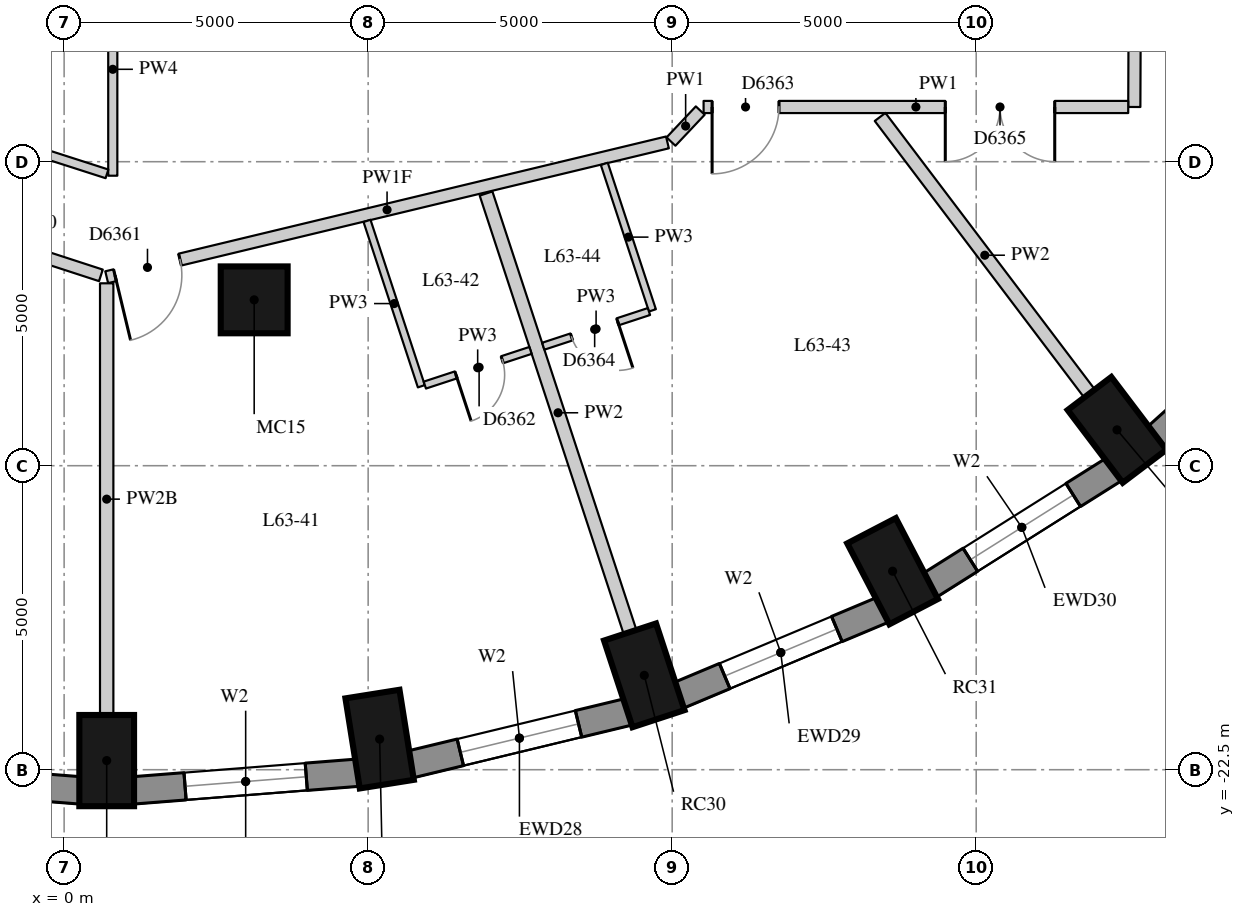
"""IFC4 building model, lengths in metres.
Left out: names, types, materials, properties, quantities, classifications, styles, units other than length and angle.
Written with IfcOpenShell. Run it as: python <this file> out.ifc"""

import sys

from ifc_helpers import new_model, si_unit, direction, frame, frame_2d, origin, origin_2d, place, context, subcontext, project, spatial, rectangle, extrude, element, fill, save


model = new_model("IFC4")
c1 = context("Model", 3, precision=1e-05, world=origin(), true_north=direction((0.0, 1.0)))
c2 = subcontext(c1, "Body", "Model", "MODEL_VIEW")
j1 = project(units=[si_unit("LENGTHUNIT", "METRE"), si_unit("PLANEANGLEUNIT", "RADIAN")], contexts=[c1])
p1 = place(None, origin())
s1 = spatial("IfcSite", under=j1, at=p1, CompositionType="ELEMENT")
p2 = place(p1, origin())
s2 = spatial("IfcBuilding", under=s1, at=p2, CompositionType="ELEMENT")
p3 = place(p2, frame((0.0, 0.0, 222.2)))
s3 = spatial("IfcBuildingStorey", under=s2, at=p3, CompositionType="ELEMENT", Elevation=222.2)
for number, where, z_axis, x_axis in (
    (1, (0.7, -22.35, 0.0), (0.0, 0.0, 1.0), (0.0, -1.0, 0.0)),
    (2, (5.189, -21.997, 0.0), (0.0, 0.0, 1.0), (0.157, -0.988, 0.0)),
    (3, (9.541, -20.948, 0.0), (0.0, 0.0, 1.0), (0.312, -0.95, 0.0)),
    (4, (13.625, -19.235, 0.0), (0.0, 0.0, 1.0), (0.462, -0.887, 0.0)),
    (5, (17.316, -16.911, 0.0), (0.0, 0.0, 1.0), (0.604, -0.797, 0.0)),
):
    element("IfcColumn", number, at=place(p3, frame(where, z_axis=z_axis, x_axis=x_axis)), inside=s3, PredefinedType="COLUMN", context=c2, shape_type="SweptSolid", body=[
        extrude(rectangle(XDim=1.5, YDim=0.9, at=origin_2d()), origin(), (0.0, 0.0, 1.0), 3.3),
    ])
p4 = place(p3, frame((3.126, -14.772, 0.0), z_axis=(0.0, 0.0, 1.0), x_axis=(1.0, 0.0, 0.0)))
e6 = element("IfcColumn", 6, at=p4, inside=s3, PredefinedType="COLUMN", context=c2, shape_type="SweptSolid", body=[
    extrude(rectangle(XDim=1.1, YDim=1.1, at=origin_2d()), origin(), (0.0, 0.0, 1.0), 3.3),
])
p5 = place(p3, frame((-3.441, -22.548, 0.0), z_axis=(0.0, 0.0, 1.0), x_axis=(0.996913971077, -0.078501810629, 0.0)))
e7 = element("IfcWall", 7, at=p5, inside=s3, PredefinedType="SOLIDWALL", context=c2, shape_type="SweptSolid", body=[
    extrude(rectangle(XDim=3.723, YDim=0.45, at=frame_2d((1.861, 0.0))), origin(), (0.0, 0.0, 1.0), 3.02),
])
p6 = place(p5, frame((0.861, 0.0, 0.4)))
e8 = element("IfcOpeningElement", 8, at=p6, cuts=e7, PredefinedType="OPENING", context=c2, shape_type="SweptSolid", body=[
    extrude(rectangle(XDim=2.0, YDim=1.75, at=frame_2d((1.0, 0.875))), frame((0.0, 0.235, 0.0), z_axis=(0.0, -1.0, 0.0), x_axis=(1.0, 0.0, 0.0)), (0.0, 0.0, 1.0), 0.47),
])
p7 = place(p3, frame((1.13, -22.841, 0.0), z_axis=(0.0, 0.0, 1.0), x_axis=(0.996913566885, 0.078506943392, 0.0)))
e9 = element("IfcWall", 9, at=p7, inside=s3, PredefinedType="SOLIDWALL", context=c2, shape_type="SweptSolid", body=[
    extrude(rectangle(XDim=3.722, YDim=0.45, at=frame_2d((1.861, 0.0))), origin(), (0.0, 0.0, 1.0), 3.02),
])
p8 = place(p7, frame((0.861, 0.0, 0.4)))
e10 = element("IfcOpeningElement", 10, at=p8, cuts=e9, PredefinedType="OPENING", context=c2, shape_type="SweptSolid", body=[
    extrude(rectangle(XDim=2.0, YDim=1.75, at=frame_2d((1.0, 0.875))), frame((0.0, 0.235, 0.0), z_axis=(0.0, -1.0, 0.0), x_axis=(1.0, 0.0, 0.0)), (0.0, 0.0, 1.0), 0.47),
])
p9 = place(p3, frame((5.691, -22.414, 0.0), z_axis=(0.0, 0.0, 1.0), x_axis=(0.9721584944, 0.234324266275, 0.0)))
e11 = element("IfcWall", 11, at=p9, inside=s3, PredefinedType="SOLIDWALL", context=c2, shape_type="SweptSolid", body=[
    extrude(rectangle(XDim=3.698, YDim=0.45, at=frame_2d((1.849, 0.0))), origin(), (0.0, 0.0, 1.0), 3.02),
])
p10 = place(p9, frame((0.849, 0.0, 0.4)))
e12 = element("IfcOpeningElement", 12, at=p10, cuts=e11, PredefinedType="OPENING", context=c2, shape_type="SweptSolid", body=[
    extrude(rectangle(XDim=2.0, YDim=1.75, at=frame_2d((1.0, 0.875))), frame((0.0, 0.235, 0.0), z_axis=(0.0, -1.0, 0.0), x_axis=(1.0, 0.0, 0.0)), (0.0, 0.0, 1.0), 0.47),
])
p11 = place(p3, frame((10.103, -21.279, 0.0), z_axis=(0.0, 0.0, 1.0), x_axis=(0.922168222612, 0.386789050006, 0.0)))
e13 = element("IfcWall", 13, at=p11, inside=s3, PredefinedType="SOLIDWALL", context=c2, shape_type="SweptSolid", body=[
    extrude(rectangle(XDim=3.651, YDim=0.45, at=frame_2d((1.825, 0.0))), origin(), (0.0, 0.0, 1.0), 3.02),
])
p12 = place(p11, frame((0.825, 0.0, 0.4)))
e14 = element("IfcOpeningElement", 14, at=p12, cuts=e13, PredefinedType="OPENING", context=c2, shape_type="SweptSolid", body=[
    extrude(rectangle(XDim=2.0, YDim=1.75, at=frame_2d((1.0, 0.875))), frame((0.0, 0.235, 0.0), z_axis=(0.0, -1.0, 0.0), x_axis=(1.0, 0.0, 0.0)), (0.0, 0.0, 1.0), 0.47),
])
p13 = place(p3, frame((14.232, -19.47, 0.0), z_axis=(0.0, 0.0, 1.0), x_axis=(0.84614984472, 0.532945063098, 0.0)))
e15 = element("IfcWall", 15, at=p13, inside=s3, PredefinedType="SOLIDWALL", context=c2, shape_type="SweptSolid", body=[
    extrude(rectangle(XDim=3.586, YDim=0.45, at=frame_2d((1.793, 0.0))), origin(), (0.0, 0.0, 1.0), 3.02),
])
p14 = place(p13, frame((0.793, 0.0, 0.4)))
e16 = element("IfcOpeningElement", 16, at=p14, cuts=e15, PredefinedType="OPENING", context=c2, shape_type="SweptSolid", body=[
    extrude(rectangle(XDim=2.0, YDim=1.75, at=frame_2d((1.0, 0.875))), frame((0.0, 0.235, 0.0), z_axis=(0.0, -1.0, 0.0), x_axis=(1.0, 0.0, 0.0)), (0.0, 0.0, 1.0), 0.47),
])
p15 = place(p3, frame((17.953, -17.04, 0.0), z_axis=(0.0, 0.0, 1.0), x_axis=(0.743442727602, 0.668799604348, 0.0)))
e17 = element("IfcWall", 17, at=p15, inside=s3, PredefinedType="SOLIDWALL", context=c2, shape_type="SweptSolid", body=[
    extrude(rectangle(XDim=3.513, YDim=0.45, at=frame_2d((1.756, 0.0))), origin(), (0.0, 0.0, 1.0), 3.02),
])
p16 = place(p3, frame((17.63, -4.043, 0.0), z_axis=(0.0, 0.0, 1.0), x_axis=(-0.003908870153, -0.999992360338, 0.0)))
e18 = element("IfcWall", 18, at=p16, inside=s3, PredefinedType="PARTITIONING", context=c2, shape_type="SweptSolid", body=[
    extrude(rectangle(XDim=7.557, YDim=0.2, at=frame_2d((3.779, 0.0))), origin(), (0.0, 0.0, 1.0), 3.02),
])
p17 = place(p3, frame((17.5, -11.6, 0.0), z_axis=(0.0, 0.0, 1.0), x_axis=(-1.0, 0.0, 0.0)))
e19 = element("IfcWall", 19, at=p17, inside=s3, PredefinedType="PARTITIONING", context=c2, shape_type="SweptSolid", body=[
    extrude(rectangle(XDim=6.983, YDim=0.2, at=frame_2d((3.492, 0.0))), origin(), (0.0, 0.0, 1.0), 3.02),
])
p18 = place(p17, frame((5.743, 0.0, 0.0)))
e20 = element("IfcOpeningElement", 20, at=p18, cuts=e19, PredefinedType="OPENING", context=c2, shape_type="SweptSolid", body=[
    extrude(rectangle(XDim=1.1, YDim=2.1, at=frame_2d((0.55, 1.05))), frame((0.0, 0.11, 0.0), z_axis=(0.0, -1.0, 0.0), x_axis=(1.0, 0.0, 0.0)), (0.0, 0.0, 1.0), 0.22),
])
p19 = place(p17, frame((1.208, 0.0, 0.0)))
e21 = element("IfcOpeningElement", 21, at=p19, cuts=e19, PredefinedType="OPENING", context=c2, shape_type="SweptSolid", body=[
    extrude(rectangle(XDim=1.8, YDim=2.1, at=frame_2d((0.9, 1.05))), frame((0.0, 0.11, 0.0), z_axis=(0.0, -1.0, 0.0), x_axis=(1.0, 0.0, 0.0)), (0.0, 0.0, 1.0), 0.22),
])
p20 = place(p3, frame((10.462, -11.659, 0.0), z_axis=(0.0, 0.0, 1.0), x_axis=(-0.686265612426, -0.727351021998, 0.0)))
e22 = element("IfcWall", 22, at=p20, inside=s3, PredefinedType="PARTITIONING", context=c2, shape_type="SweptSolid", body=[
    extrude(rectangle(XDim=0.701, YDim=0.2, at=frame_2d((0.351, 0.0))), origin(), (0.0, 0.0, 1.0), 3.02),
])
p21 = place(p3, frame((9.922, -12.183, 0.0), z_axis=(0.0, 0.0, 1.0), x_axis=(-0.972292362394, -0.233768180104, 0.0)))
e23 = element("IfcWall", 23, at=p21, inside=s3, PredefinedType="PARTITIONING", context=c2, shape_type="SweptSolid", body=[
    extrude(rectangle(XDim=9.485, YDim=0.2, at=frame_2d((4.742, 0.0))), origin(), (0.0, 0.0, 1.0), 2.42),
])
p22 = place(p21, frame((8.245, 0.0, 0.0)))
e24 = element("IfcOpeningElement", 24, at=p22, cuts=e23, PredefinedType="OPENING", context=c2, shape_type="SweptSolid", body=[
    extrude(rectangle(XDim=1.1, YDim=2.1, at=frame_2d((0.55, 1.05))), frame((0.0, 0.11, 0.0), z_axis=(0.0, -1.0, 0.0), x_axis=(1.0, 0.0, 0.0)), (0.0, 0.0, 1.0), 0.22),
])
p23 = place(p3, frame((0.605, -14.369, 0.0), z_axis=(0.0, 0.0, 1.0), x_axis=(-0.950994614205, 0.309207444529, 0.0)))
e25 = element("IfcWall", 25, at=p23, inside=s3, PredefinedType="PARTITIONING", context=c2, shape_type="SweptSolid", body=[
    extrude(rectangle(XDim=8.733, YDim=0.2, at=frame_2d((4.366, 0.0))), origin(), (0.0, 0.0, 1.0), 3.02),
])
p24 = place(p23, frame((7.04, 0.0, 0.0)))
e26 = element("IfcOpeningElement", 26, at=p24, cuts=e25, PredefinedType="OPENING", context=c2, shape_type="SweptSolid", body=[
    extrude(rectangle(XDim=0.9, YDim=2.1, at=frame_2d((0.45, 1.05))), frame((0.0, 0.11, 0.0), z_axis=(0.0, -1.0, 0.0), x_axis=(1.0, 0.0, 0.0)), (0.0, 0.0, 1.0), 0.22),
])
p25 = place(p23, frame((4.375, 0.0, 0.0)))
e27 = element("IfcOpeningElement", 27, at=p25, cuts=e25, PredefinedType="OPENING", context=c2, shape_type="SweptSolid", body=[
    extrude(rectangle(XDim=0.9, YDim=2.1, at=frame_2d((0.45, 1.05))), frame((0.0, 0.11, 0.0), z_axis=(0.0, -1.0, 0.0), x_axis=(1.0, 0.0, 0.0)), (0.0, 0.0, 1.0), 0.22),
])
p26 = place(p23, frame((1.145, 0.0, 0.0)))
e28 = element("IfcOpeningElement", 28, at=p26, cuts=e25, PredefinedType="OPENING", context=c2, shape_type="SweptSolid", body=[
    extrude(rectangle(XDim=0.9, YDim=2.1, at=frame_2d((0.45, 1.05))), frame((0.0, 0.11, 0.0), z_axis=(0.0, -1.0, 0.0), x_axis=(1.0, 0.0, 0.0)), (0.0, 0.0, 1.0), 0.22),
])
p27 = place(p3, frame((0.8, -9.23, 0.0), z_axis=(0.0, 0.0, 1.0), x_axis=(0.0, -1.0, 0.0)))
e29 = element("IfcWall", 29, at=p27, inside=s3, PredefinedType="PARTITIONING", context=c2, shape_type="SweptSolid", body=[
    extrude(rectangle(XDim=3.5, YDim=0.15, at=frame_2d((1.75, 0.0))), origin(), (0.0, 0.0, 1.0), 3.02),
])
p28 = place(p3, frame((0.705, -12.7, 0.0), z_axis=(0.0, 0.0, 1.0), x_axis=(-0.952035530576, 0.305987497327, 0.0)))
e30 = element("IfcWall", 30, at=p28, inside=s3, PredefinedType="PARTITIONING", context=c2, shape_type="SweptSolid", body=[
    extrude(rectangle(XDim=5.467, YDim=0.15, at=frame_2d((2.733, 0.0))), origin(), (0.0, 0.0, 1.0), 3.02),
])
p29 = place(p3, frame((0.7, -21.6, 0.0), z_axis=(0.0, 0.0, 1.0), x_axis=(0.0, 1.0, 0.0)))
e31 = element("IfcWall", 31, at=p29, inside=s3, PredefinedType="PARTITIONING", context=c2, shape_type="SweptSolid", body=[
    extrude(rectangle(XDim=7.1, YDim=0.22, at=frame_2d((3.55, 0.0))), origin(), (0.0, 0.0, 1.0), 2.57),
])
p30 = place(p3, frame((9.307, -20.235, 0.0), z_axis=(0.0, 0.0, 1.0), x_axis=(-0.311979110549, 0.950088961404, 0.0)))
e32 = element("IfcWall", 32, at=p30, inside=s3, PredefinedType="PARTITIONING", context=c2, shape_type="SweptSolid", body=[
    extrude(rectangle(XDim=7.591, YDim=0.22, at=frame_2d((3.795, 0.0))), origin(), (0.0, 0.0, 1.0), 3.02),
])
p31 = place(p3, frame((16.863, -16.312, 0.0), z_axis=(0.0, 0.0, 1.0), x_axis=(-0.603636051313, 0.797260006243, 0.0)))
e33 = element("IfcWall", 33, at=p31, inside=s3, PredefinedType="PARTITIONING", context=c2, shape_type="SweptSolid", body=[
    extrude(rectangle(XDim=5.706, YDim=0.22, at=frame_2d((2.853, 0.0))), origin(), (0.0, 0.0, 1.0), 3.02),
])
p32 = place(p3, frame((4.981, -13.473, 0.0), z_axis=(0.0, 0.0, 1.0), x_axis=(0.312029038347, -0.950072565243, 0.0)))
e34 = element("IfcWall", 34, at=p32, inside=s3, PredefinedType="PARTITIONING", context=c2, shape_type="SweptSolid", body=[
    extrude(rectangle(XDim=2.863, YDim=0.12, at=frame_2d((1.431, 0.0))), origin(), (0.0, 0.0, 1.0), 3.02),
])
p33 = place(p3, frame((8.884, -12.535, 0.0), z_axis=(0.0, 0.0, 1.0), x_axis=(0.312037873477, -0.950069663507, 0.0)))
e35 = element("IfcWall", 35, at=p33, inside=s3, PredefinedType="PARTITIONING", context=c2, shape_type="SweptSolid", body=[
    extrude(rectangle(XDim=2.537, YDim=0.12, at=frame_2d((1.268, 0.0))), origin(), (0.0, 0.0, 1.0), 3.02),
])
p34 = place(p3, frame((5.932, -16.174, 0.0), z_axis=(0.0, 0.0, 1.0), x_axis=(0.950140787885, 0.311821235962, 0.0)))
e36 = element("IfcWall", 36, at=p34, inside=s3, PredefinedType="PARTITIONING", context=c2, shape_type="SweptSolid", body=[
    extrude(rectangle(XDim=1.83, YDim=0.12, at=frame_2d((0.915, 0.0))), origin(), (0.0, 0.0, 1.0), 3.02),
])
p35 = place(p34, frame((0.54, 0.0, 0.0)))
e37 = element("IfcOpeningElement", 37, at=p35, cuts=e36, PredefinedType="OPENING", context=c2, shape_type="SweptSolid", body=[
    extrude(rectangle(XDim=0.8, YDim=2.1, at=frame_2d((0.4, 1.05))), frame((0.0, 0.07, 0.0), z_axis=(0.0, -1.0, 0.0), x_axis=(1.0, 0.0, 0.0)), (0.0, 0.0, 1.0), 0.14),
])
p36 = place(p3, frame((9.618, -14.964, 0.0), z_axis=(0.0, 0.0, 1.0), x_axis=(-0.950140787885, -0.311821235962, 0.0)))
e38 = element("IfcWall", 38, at=p36, inside=s3, PredefinedType="PARTITIONING", context=c2, shape_type="SweptSolid", body=[
    extrude(rectangle(XDim=1.83, YDim=0.12, at=frame_2d((0.915, 0.0))), origin(), (0.0, 0.0, 1.0), 3.02),
])
p37 = place(p36, frame((0.54, 0.0, 0.0)))
e39 = element("IfcOpeningElement", 39, at=p37, cuts=e38, PredefinedType="OPENING", context=c2, shape_type="SweptSolid", body=[
    extrude(rectangle(XDim=0.8, YDim=2.1, at=frame_2d((0.4, 1.05))), frame((0.0, 0.07, 0.0), z_axis=(0.0, -1.0, 0.0), x_axis=(1.0, 0.0, 0.0)), (0.0, 0.0, 1.0), 0.14),
])
p38 = place(p8, origin())
e40 = element("IfcWindow", 40, at=p38, inside=s3, PartitioningType="SINGLE_PANEL", PredefinedType="WINDOW", context=c2, shape_type="SweptSolid", body=[
    extrude(rectangle(XDim=2.0, YDim=1.75, at=frame_2d((1.0, 0.875))), frame((0.0, 0.035, 0.0), z_axis=(0.0, -1.0, 0.0), x_axis=(1.0, 0.0, 0.0)), (0.0, 0.0, 1.0), 0.06),
])
fill(e10, e40)
p39 = place(p10, origin())
e41 = element("IfcWindow", 41, at=p39, inside=s3, PartitioningType="SINGLE_PANEL", PredefinedType="WINDOW", context=c2, shape_type="SweptSolid", body=[
    extrude(rectangle(XDim=2.0, YDim=1.75, at=frame_2d((1.0, 0.875))), frame((0.0, 0.035, 0.0), z_axis=(0.0, -1.0, 0.0), x_axis=(1.0, 0.0, 0.0)), (0.0, 0.0, 1.0), 0.06),
])
fill(e12, e41)
p40 = place(p12, origin())
e42 = element("IfcWindow", 42, at=p40, inside=s3, PartitioningType="SINGLE_PANEL", PredefinedType="WINDOW", context=c2, shape_type="SweptSolid", body=[
    extrude(rectangle(XDim=2.0, YDim=1.75, at=frame_2d((1.0, 0.875))), frame((0.0, 0.035, 0.0), z_axis=(0.0, -1.0, 0.0), x_axis=(1.0, 0.0, 0.0)), (0.0, 0.0, 1.0), 0.06),
])
fill(e14, e42)
p41 = place(p14, origin())
e43 = element("IfcWindow", 43, at=p41, inside=s3, PartitioningType="SINGLE_PANEL", PredefinedType="WINDOW", context=c2, shape_type="SweptSolid", body=[
    extrude(rectangle(XDim=2.0, YDim=1.75, at=frame_2d((1.0, 0.875))), frame((0.0, 0.035, 0.0), z_axis=(0.0, -1.0, 0.0), x_axis=(1.0, 0.0, 0.0)), (0.0, 0.0, 1.0), 0.06),
])
fill(e16, e43)
p42 = place(p22, origin())
e44 = element("IfcDoor", 44, at=p42, inside=s3, OperationType="SINGLE_SWING_RIGHT", PredefinedType="DOOR", context=c2, shape_type="SweptSolid", body=[
    extrude(rectangle(XDim=1.1, YDim=2.1, at=frame_2d((0.55, 1.05))), frame((0.0, 0.025, 0.0), z_axis=(0.0, -1.0, 0.0), x_axis=(1.0, 0.0, 0.0)), (0.0, 0.0, 1.0), 0.05),
])
fill(e24, e44)
p43 = place(p35, origin())
e45 = element("IfcDoor", 45, at=p43, inside=s3, OperationType="SINGLE_SWING_RIGHT", PredefinedType="DOOR", context=c2, shape_type="SweptSolid", body=[
    extrude(rectangle(XDim=0.8, YDim=2.1, at=frame_2d((0.4, 1.05))), frame((0.0, 0.025, 0.0), z_axis=(0.0, -1.0, 0.0), x_axis=(1.0, 0.0, 0.0)), (0.0, 0.0, 1.0), 0.05),
])
fill(e37, e45)
p44 = place(p18, origin())
e46 = element("IfcDoor", 46, at=p44, inside=s3, OperationType="SINGLE_SWING_RIGHT", PredefinedType="DOOR", context=c2, shape_type="SweptSolid", body=[
    extrude(rectangle(XDim=1.1, YDim=2.1, at=frame_2d((0.55, 1.05))), frame((0.0, 0.025, 0.0), z_axis=(0.0, -1.0, 0.0), x_axis=(1.0, 0.0, 0.0)), (0.0, 0.0, 1.0), 0.05),
])
fill(e20, e46)
p45 = place(p37, origin())
e47 = element("IfcDoor", 47, at=p45, inside=s3, OperationType="SINGLE_SWING_LEFT", PredefinedType="DOOR", context=c2, shape_type="SweptSolid", body=[
    extrude(rectangle(XDim=0.8, YDim=2.1, at=frame_2d((0.4, 1.05))), frame((0.0, 0.025, 0.0), z_axis=(0.0, -1.0, 0.0), x_axis=(1.0, 0.0, 0.0)), (0.0, 0.0, 1.0), 0.05),
])
fill(e39, e47)
p46 = place(p19, origin())
e48 = element("IfcDoor", 48, at=p46, inside=s3, OperationType="DOUBLE_DOOR_SINGLE_SWING", PredefinedType="DOOR", context=c2, shape_type="SweptSolid", body=[
    extrude(rectangle(XDim=1.8, YDim=2.1, at=frame_2d((0.9, 1.05))), frame((0.0, 0.025, 0.0), z_axis=(0.0, -1.0, 0.0), x_axis=(1.0, 0.0, 0.0)), (0.0, 0.0, 1.0), 0.05),
])
fill(e21, e48)
save(model, sys.argv[1])
